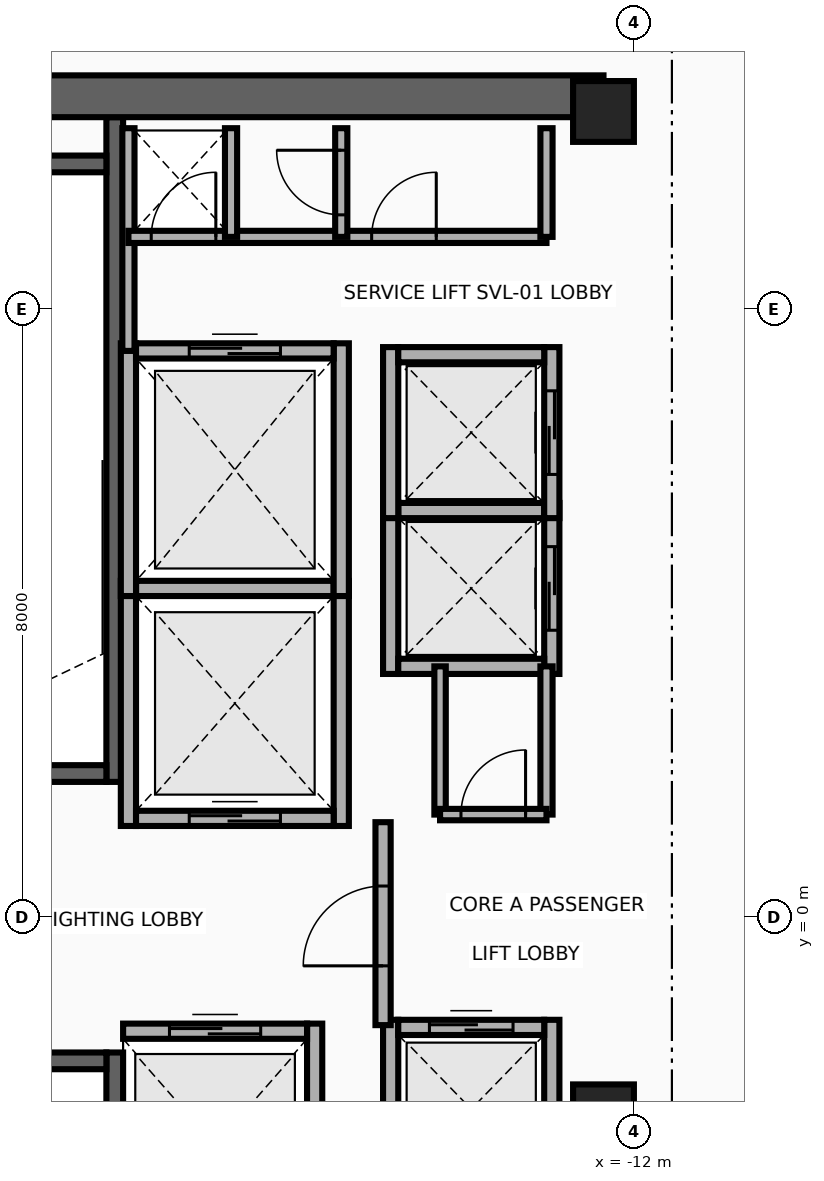
"""IFC4 building model, lengths in metres.
Left out: names, types, materials, properties, quantities, classifications, styles, units other than length and angle.
Written with IfcOpenShell. Run it as: python <this file> out.ifc"""

import sys

from ifc_helpers import new_model, si_unit, direction, frame, frame_2d, origin, origin_2d, place, context, subcontext, project, spatial, rectangle, extrude, source, transform, mapped, element, fill, save


model = new_model("IFC4")
c1 = context("Model", 3, precision=1e-05, world=origin(), true_north=direction((0.0, 1.0)))
c2 = subcontext(c1, "Body", "Model", "MODEL_VIEW")
j1 = project(units=[si_unit("LENGTHUNIT", "METRE"), si_unit("PLANEANGLEUNIT", "RADIAN")], contexts=[c1])
p1 = place(None, origin())
s1 = spatial("IfcSite", under=j1, at=p1, CompositionType="ELEMENT")
p2 = place(p1, origin())
s2 = spatial("IfcBuilding", under=s1, at=p2, CompositionType="ELEMENT")
p3 = place(p2, frame((0.0, 0.0, 240.5)))
s3 = spatial("IfcBuildingStorey", under=s2, at=p3, CompositionType="ELEMENT", Elevation=240.5)
p4 = place(p3, frame((-18.83, 1.78, 0.0), z_axis=(0.0, 0.0, 1.0), x_axis=(0.0, 1.0, 0.0)))
e1 = element("IfcWall", 1, at=p4, inside=s3, PredefinedType="SHEAR", context=c2, shape_type="SweptSolid", body=[
    extrude(rectangle(XDim=8.745, YDim=0.22, at=frame_2d((4.373, 0.0))), origin(), (0.0, 0.0, 1.0), 3.26),
])
p5 = place(p3, frame((-22.05, 1.89, 0.0), z_axis=(0.0, 0.0, 1.0), x_axis=(1.0, 0.0, 0.0)))
e2 = element("IfcWall", 2, at=p5, inside=s3, PredefinedType="SHEAR", context=c2, shape_type="SweptSolid", body=[
    extrude(rectangle(XDim=3.11, YDim=0.22, at=frame_2d((1.555, 0.0))), origin(), (0.0, 0.0, 1.0), 3.26),
])
p6 = place(p5, frame((1.0, 0.0, 0.0)))
e3 = element("IfcOpeningElement", 3, at=p6, cuts=e2, PredefinedType="OPENING", context=c2, shape_type="SweptSolid", body=[
    extrude(rectangle(XDim=1.1, YDim=2.15, at=frame_2d((0.55, 1.075))), frame((0.0, 0.125, 0.0), z_axis=(0.0, -1.0, 0.0), x_axis=(1.0, 0.0, 0.0)), (0.0, 0.0, 1.0), 0.25),
])
p7 = place(p3, frame((-22.05, 9.91, 0.0), z_axis=(0.0, 0.0, 1.0), x_axis=(1.0, 0.0, 0.0)))
e4 = element("IfcWall", 4, at=p7, inside=s3, PredefinedType="SHEAR", context=c2, shape_type="SweptSolid", body=[
    extrude(rectangle(XDim=3.11, YDim=0.22, at=frame_2d((1.555, 0.0))), origin(), (0.0, 0.0, 1.0), 3.26),
])
p8 = place(p3, frame((-18.83, -10.525, 0.0), z_axis=(0.0, 0.0, 1.0), x_axis=(0.0, 1.0, 0.0)))
e5 = element("IfcWall", 5, at=p8, inside=s3, PredefinedType="SHEAR", context=c2, shape_type="SweptSolid", body=[
    extrude(rectangle(XDim=8.745, YDim=0.22, at=frame_2d((4.373, 0.0))), origin(), (0.0, 0.0, 1.0), 3.26),
])
p9 = place(p3, frame((-22.05, -1.89, 0.0), z_axis=(0.0, 0.0, 1.0), x_axis=(1.0, 0.0, 0.0)))
e6 = element("IfcWall", 6, at=p9, inside=s3, PredefinedType="SHEAR", context=c2, shape_type="SweptSolid", body=[
    extrude(rectangle(XDim=3.11, YDim=0.22, at=frame_2d((1.555, 0.0))), origin(), (0.0, 0.0, 1.0), 3.26),
])
p10 = place(p9, frame((1.0, 0.0, 0.0)))
e7 = element("IfcOpeningElement", 7, at=p10, cuts=e6, PredefinedType="OPENING", context=c2, shape_type="SweptSolid", body=[
    extrude(rectangle(XDim=1.1, YDim=2.15, at=frame_2d((0.55, 1.075))), frame((0.0, 0.125, 0.0), z_axis=(0.0, -1.0, 0.0), x_axis=(1.0, 0.0, 0.0)), (0.0, 0.0, 1.0), 0.25),
])
p11 = place(p3, frame((-22.65, 10.8, 0.0), z_axis=(0.0, 0.0, 1.0), x_axis=(1.0, 0.0, 0.0)))
e8 = element("IfcWall", 8, at=p11, inside=s3, PredefinedType="SHEAR", context=c2, shape_type="SweptSolid", body=[
    extrude(rectangle(XDim=10.25, YDim=0.55, at=frame_2d((5.125, 0.0))), origin(), (0.0, 0.0, 1.0), 3.26),
])
m1 = source(origin(), c2, "Body", "SweptSolid", [
    extrude(rectangle(XDim=0.8, YDim=0.8, at=origin_2d()), origin(), (0.0, 0.0, 1.0), 3.5),
])
for number, where, z_axis, x_axis in (
    (9, (-12.4, -2.6, 0.0), (0.0, 0.0, 1.0), (1.0, 0.0, 0.0)),
    (10, (-12.4, 10.6, 0.0), (0.0, 0.0, 1.0), (1.0, 0.0, 0.0)),
):
    element("IfcColumn", number, at=place(p3, frame(where, z_axis=z_axis, x_axis=x_axis)), inside=s3, PredefinedType="COLUMN", context=c2, shape_type="MappedRepresentation", body=[
        mapped(m1, transform((0.0, 0.0, 0.0), x_axis=(1.0, 0.0, 0.0), y_axis=(0.0, 1.0, 0.0), z_axis=(0.0, 0.0, 1.0), scale=1.0)),
    ])
for number, where, z_axis, x_axis in (
    (11, (-18.65, 1.2, 0.0), (0.0, 0.0, 1.0), (0.0, 1.0, 0.0)),
    (12, (-15.85, 1.2, 0.0), (0.0, 0.0, 1.0), (0.0, 1.0, 0.0)),
):
    element("IfcWall", number, at=place(p3, frame(where, z_axis=z_axis, x_axis=x_axis)), inside=s3, PredefinedType="MOVABLE", context=c2, shape_type="SweptSolid", body=[
        extrude(rectangle(XDim=3.225, YDim=0.2, at=frame_2d((1.613, 0.0))), origin(), (0.0, 0.0, 1.0), 3.26),
    ])
p12 = place(p3, frame((-18.55, 1.3, 0.0), z_axis=(0.0, 0.0, 1.0), x_axis=(1.0, 0.0, 0.0)))
e13 = element("IfcWall", 13, at=p12, inside=s3, PredefinedType="MOVABLE", context=c2, shape_type="SweptSolid", body=[
    extrude(rectangle(XDim=2.6, YDim=0.2, at=frame_2d((1.3, 0.0))), origin(), (0.0, 0.0, 1.0), 3.26),
])
p13 = place(p12, frame((0.7, 0.0, 0.0)))
e14 = element("IfcOpeningElement", 14, at=p13, cuts=e13, PredefinedType="OPENING", context=c2, shape_type="SweptSolid", body=[
    extrude(rectangle(XDim=1.2, YDim=2.1, at=frame_2d((0.6, 1.05))), frame((0.0, 0.115, 0.0), z_axis=(0.0, -1.0, 0.0), x_axis=(1.0, 0.0, 0.0)), (0.0, 0.0, 1.0), 0.23),
])
p14 = place(p3, frame((-18.55, 4.325, 0.0), z_axis=(0.0, 0.0, 1.0), x_axis=(1.0, 0.0, 0.0)))
e15 = element("IfcWall", 15, at=p14, inside=s3, PredefinedType="MOVABLE", context=c2, shape_type="SweptSolid", body=[
    extrude(rectangle(XDim=2.6, YDim=0.2, at=frame_2d((1.3, 0.0))), origin(), (0.0, 0.0, 1.0), 3.26),
])
p15 = place(p3, frame((-16.2, -4.6, 0.0), z_axis=(0.0, 0.0, 1.0), x_axis=(0.0, 1.0, 0.0)))
e16 = element("IfcWall", 16, at=p15, inside=s3, PredefinedType="MOVABLE", context=c2, shape_type="SweptSolid", body=[
    extrude(rectangle(XDim=3.2, YDim=0.2, at=frame_2d((1.6, 0.0))), origin(), (0.0, 0.0, 1.0), 3.26),
])
p16 = place(p3, frame((-18.72, -1.5, 0.0), z_axis=(0.0, 0.0, 1.0), x_axis=(1.0, 0.0, 0.0)))
e17 = element("IfcWall", 17, at=p16, inside=s3, PredefinedType="MOVABLE", context=c2, shape_type="SweptSolid", body=[
    extrude(rectangle(XDim=2.42, YDim=0.2, at=frame_2d((1.21, 0.0))), origin(), (0.0, 0.0, 1.0), 3.26),
])
p17 = place(p16, frame((0.61, 0.0, 0.0)))
e18 = element("IfcOpeningElement", 18, at=p17, cuts=e17, PredefinedType="OPENING", context=c2, shape_type="SweptSolid", body=[
    extrude(rectangle(XDim=1.2, YDim=2.1, at=frame_2d((0.6, 1.05))), frame((0.0, 0.115, 0.0), z_axis=(0.0, -1.0, 0.0), x_axis=(1.0, 0.0, 0.0)), (0.0, 0.0, 1.0), 0.23),
])
for number, where, z_axis, x_axis in (
    (19, (-18.65, 4.225, 0.0), (0.0, 0.0, 1.0), (0.0, 1.0, 0.0)),
    (20, (-15.85, 4.225, 0.0), (0.0, 0.0, 1.0), (0.0, 1.0, 0.0)),
):
    element("IfcWall", number, at=place(p3, frame(where, z_axis=z_axis, x_axis=x_axis)), inside=s3, PredefinedType="MOVABLE", context=c2, shape_type="SweptSolid", body=[
        extrude(rectangle(XDim=3.325, YDim=0.2, at=frame_2d((1.663, 0.0))), origin(), (0.0, 0.0, 1.0), 3.26),
    ])
p18 = place(p3, frame((-18.55, 7.45, 0.0), z_axis=(0.0, 0.0, 1.0), x_axis=(1.0, 0.0, 0.0)))
e21 = element("IfcWall", 21, at=p18, inside=s3, PredefinedType="MOVABLE", context=c2, shape_type="SweptSolid", body=[
    extrude(rectangle(XDim=2.6, YDim=0.2, at=frame_2d((1.3, 0.0))), origin(), (0.0, 0.0, 1.0), 3.26),
])
p19 = place(p18, frame((0.7, 0.0, 0.0)))
e22 = element("IfcOpeningElement", 22, at=p19, cuts=e21, PredefinedType="OPENING", context=c2, shape_type="SweptSolid", body=[
    extrude(rectangle(XDim=1.2, YDim=2.1, at=frame_2d((0.6, 1.05))), frame((0.0, 0.115, 0.0), z_axis=(0.0, -1.0, 0.0), x_axis=(1.0, 0.0, 0.0)), (0.0, 0.0, 1.0), 0.23),
])
p20 = place(p3, frame((-15.2, 3.2, 0.0), z_axis=(0.0, 0.0, 1.0), x_axis=(0.0, 1.0, 0.0)))
e23 = element("IfcWall", 23, at=p20, inside=s3, PredefinedType="MOVABLE", context=c2, shape_type="SweptSolid", body=[
    extrude(rectangle(XDim=2.25, YDim=0.2, at=frame_2d((1.125, 0.0))), origin(), (0.0, 0.0, 1.0), 3.26),
])
p21 = place(p3, frame((-13.08, 3.2, 0.0), z_axis=(0.0, 0.0, 1.0), x_axis=(0.0, 1.0, 0.0)))
e24 = element("IfcWall", 24, at=p21, inside=s3, PredefinedType="MOVABLE", context=c2, shape_type="SweptSolid", body=[
    extrude(rectangle(XDim=2.25, YDim=0.2, at=frame_2d((1.125, 0.0))), origin(), (0.0, 0.0, 1.0), 3.26),
])
p22 = place(p21, frame((0.575, 0.0, 0.0)))
e25 = element("IfcOpeningElement", 25, at=p22, cuts=e24, PredefinedType="OPENING", context=c2, shape_type="SweptSolid", body=[
    extrude(rectangle(XDim=1.1, YDim=2.1, at=frame_2d((0.55, 1.05))), frame((0.0, 0.115, 0.0), z_axis=(0.0, -1.0, 0.0), x_axis=(1.0, 0.0, 0.0)), (0.0, 0.0, 1.0), 0.23),
])
for number, where, z_axis, x_axis in (
    (26, (-15.1, 3.3, 0.0), (0.0, 0.0, 1.0), (1.0, 0.0, 0.0)),
    (27, (-15.1, 5.35, 0.0), (0.0, 0.0, 1.0), (1.0, 0.0, 0.0)),
):
    element("IfcWall", number, at=place(p3, frame(where, z_axis=z_axis, x_axis=x_axis)), inside=s3, PredefinedType="MOVABLE", context=c2, shape_type="SweptSolid", body=[
        extrude(rectangle(XDim=1.92, YDim=0.2, at=frame_2d((0.96, 0.0))), origin(), (0.0, 0.0, 1.0), 3.26),
    ])
p23 = place(p3, frame((-15.2, 5.25, 0.0), z_axis=(0.0, 0.0, 1.0), x_axis=(0.0, 1.0, 0.0)))
e28 = element("IfcWall", 28, at=p23, inside=s3, PredefinedType="MOVABLE", context=c2, shape_type="SweptSolid", body=[
    extrude(rectangle(XDim=2.25, YDim=0.2, at=frame_2d((1.125, 0.0))), origin(), (0.0, 0.0, 1.0), 3.26),
])
p24 = place(p3, frame((-13.08, 5.25, 0.0), z_axis=(0.0, 0.0, 1.0), x_axis=(0.0, 1.0, 0.0)))
e29 = element("IfcWall", 29, at=p24, inside=s3, PredefinedType="MOVABLE", context=c2, shape_type="SweptSolid", body=[
    extrude(rectangle(XDim=2.25, YDim=0.2, at=frame_2d((1.125, 0.0))), origin(), (0.0, 0.0, 1.0), 3.26),
])
p25 = place(p24, frame((0.575, 0.0, 0.0)))
e30 = element("IfcOpeningElement", 30, at=p25, cuts=e29, PredefinedType="OPENING", context=c2, shape_type="SweptSolid", body=[
    extrude(rectangle(XDim=1.1, YDim=2.1, at=frame_2d((0.55, 1.05))), frame((0.0, 0.115, 0.0), z_axis=(0.0, -1.0, 0.0), x_axis=(1.0, 0.0, 0.0)), (0.0, 0.0, 1.0), 0.23),
])
p26 = place(p3, frame((-15.1, 7.4, 0.0), z_axis=(0.0, 0.0, 1.0), x_axis=(1.0, 0.0, 0.0)))
e31 = element("IfcWall", 31, at=p26, inside=s3, PredefinedType="MOVABLE", context=c2, shape_type="SweptSolid", body=[
    extrude(rectangle(XDim=1.92, YDim=0.2, at=frame_2d((0.96, 0.0))), origin(), (0.0, 0.0, 1.0), 3.26),
])
for number, where, z_axis, x_axis in (
    (32, (-15.2, -3.7, 0.0), (0.0, 0.0, 1.0), (0.0, 1.0, 0.0)),
    (33, (-13.08, -3.7, 0.0), (0.0, 0.0, 1.0), (0.0, 1.0, 0.0)),
):
    element("IfcWall", number, at=place(p3, frame(where, z_axis=z_axis, x_axis=x_axis)), inside=s3, PredefinedType="MOVABLE", context=c2, shape_type="SweptSolid", body=[
        extrude(rectangle(XDim=2.35, YDim=0.2, at=frame_2d((1.175, 0.0))), origin(), (0.0, 0.0, 1.0), 3.26),
    ])
p27 = place(p3, frame((-15.1, -1.45, 0.0), z_axis=(0.0, 0.0, 1.0), x_axis=(1.0, 0.0, 0.0)))
e34 = element("IfcWall", 34, at=p27, inside=s3, PredefinedType="MOVABLE", context=c2, shape_type="SweptSolid", body=[
    extrude(rectangle(XDim=1.92, YDim=0.2, at=frame_2d((0.96, 0.0))), origin(), (0.0, 0.0, 1.0), 3.26),
])
p28 = place(p27, frame((0.41, 0.0, 0.0)))
e35 = element("IfcOpeningElement", 35, at=p28, cuts=e34, PredefinedType="OPENING", context=c2, shape_type="SweptSolid", body=[
    extrude(rectangle(XDim=1.1, YDim=2.1, at=frame_2d((0.55, 1.05))), frame((0.0, 0.115, 0.0), z_axis=(0.0, -1.0, 0.0), x_axis=(1.0, 0.0, 0.0)), (0.0, 0.0, 1.0), 0.23),
])
p29 = place(p3, frame((-15.3, -1.42, 0.0), z_axis=(0.0, 0.0, 1.0), x_axis=(0.0, 1.0, 0.0)))
e36 = element("IfcWall", 36, at=p29, inside=s3, PredefinedType="PARTITIONING", context=c2, shape_type="SweptSolid", body=[
    extrude(rectangle(XDim=2.67, YDim=0.2, at=frame_2d((1.335, 0.0))), origin(), (0.0, 0.0, 1.0), 3.26),
])
p30 = place(p29, frame((0.78, 0.0, 0.0)))
e37 = element("IfcOpeningElement", 37, at=p30, cuts=e36, PredefinedType="OPENING", context=c2, shape_type="SweptSolid", body=[
    extrude(rectangle(XDim=1.05, YDim=2.15, at=frame_2d((0.525, 1.075))), frame((0.0, 0.115, 0.0), z_axis=(0.0, -1.0, 0.0), x_axis=(1.0, 0.0, 0.0)), (0.0, 0.0, 1.0), 0.23),
])
p31 = place(p3, frame((-18.65, 7.45, 0.0), z_axis=(0.0, 0.0, 1.0), x_axis=(0.0, 1.0, 0.0)))
e38 = element("IfcWall", 38, at=p31, inside=s3, PredefinedType="PARTITIONING", context=c2, shape_type="SweptSolid", body=[
    extrude(rectangle(XDim=2.93, YDim=0.16, at=frame_2d((1.465, 0.0))), origin(), (0.0, 0.0, 1.0), 3.26),
])
p32 = place(p3, frame((-18.65, 8.95, 0.0), z_axis=(0.0, 0.0, 1.0), x_axis=(1.0, 0.0, 0.0)))
e39 = element("IfcWall", 39, at=p32, inside=s3, PredefinedType="PARTITIONING", context=c2, shape_type="SweptSolid", body=[
    extrude(rectangle(XDim=5.5, YDim=0.16, at=frame_2d((2.75, 0.0))), origin(), (0.0, 0.0, 1.0), 3.26),
])
p33 = place(p32, frame((0.3, 0.0, 0.0)))
e40 = element("IfcOpeningElement", 40, at=p33, cuts=e39, PredefinedType="OPENING", context=c2, shape_type="SweptSolid", body=[
    extrude(rectangle(XDim=0.85, YDim=2.05, at=frame_2d((0.425, 1.025))), frame((0.0, 0.095, 0.0), z_axis=(0.0, -1.0, 0.0), x_axis=(1.0, 0.0, 0.0)), (0.0, 0.0, 1.0), 0.19),
])
p34 = place(p32, frame((3.2, 0.0, 0.0)))
e41 = element("IfcOpeningElement", 41, at=p34, cuts=e39, PredefinedType="OPENING", context=c2, shape_type="SweptSolid", body=[
    extrude(rectangle(XDim=0.85, YDim=2.05, at=frame_2d((0.425, 1.025))), frame((0.0, 0.095, 0.0), z_axis=(0.0, -1.0, 0.0), x_axis=(1.0, 0.0, 0.0)), (0.0, 0.0, 1.0), 0.19),
])
for number, where, z_axis, x_axis in (
    (42, (-13.15, 8.95, 0.0), (0.0, 0.0, 1.0), (0.0, 1.0, 0.0)),
    (43, (-17.3, 8.95, 0.0), (0.0, 0.0, 1.0), (0.0, 1.0, 0.0)),
):
    element("IfcWall", number, at=place(p3, frame(where, z_axis=z_axis, x_axis=x_axis)), inside=s3, PredefinedType="PARTITIONING", context=c2, shape_type="SweptSolid", body=[
        extrude(rectangle(XDim=1.43, YDim=0.16, at=frame_2d((0.715, 0.0))), origin(), (0.0, 0.0, 1.0), 3.26),
    ])
p35 = place(p3, frame((-15.85, 8.95, 0.0), z_axis=(0.0, 0.0, 1.0), x_axis=(0.0, 1.0, 0.0)))
e44 = element("IfcWall", 44, at=p35, inside=s3, PredefinedType="PARTITIONING", context=c2, shape_type="SweptSolid", body=[
    extrude(rectangle(XDim=1.43, YDim=0.16, at=frame_2d((0.715, 0.0))), origin(), (0.0, 0.0, 1.0), 3.26),
])
p36 = place(p35, frame((0.29, 0.0, 0.0)))
e45 = element("IfcOpeningElement", 45, at=p36, cuts=e44, PredefinedType="OPENING", context=c2, shape_type="SweptSolid", body=[
    extrude(rectangle(XDim=0.85, YDim=2.05, at=frame_2d((0.425, 1.025))), frame((0.0, 0.095, 0.0), z_axis=(0.0, -1.0, 0.0), x_axis=(1.0, 0.0, 0.0)), (0.0, 0.0, 1.0), 0.19),
])
p37 = place(p3, frame((-13.15, 1.35, 0.0), z_axis=(0.0, 0.0, 1.0), x_axis=(0.0, 1.0, 0.0)))
e46 = element("IfcWall", 46, at=p37, inside=s3, PredefinedType="PARTITIONING", context=c2, shape_type="SweptSolid", body=[
    extrude(rectangle(XDim=1.95, YDim=0.16, at=frame_2d((0.975, 0.0))), origin(), (0.0, 0.0, 1.0), 3.26),
])
p38 = place(p3, frame((-14.55, 1.35, 0.0), z_axis=(0.0, 0.0, 1.0), x_axis=(0.0, 1.0, 0.0)))
e47 = element("IfcWall", 47, at=p38, inside=s3, PredefinedType="PARTITIONING", context=c2, shape_type="SweptSolid", body=[
    extrude(rectangle(XDim=1.95, YDim=0.15, at=frame_2d((0.975, 0.0))), origin(), (0.0, 0.0, 1.0), 3.26),
])
p39 = place(p3, frame((-14.55, 1.35, 0.0), z_axis=(0.0, 0.0, 1.0), x_axis=(1.0, 0.0, 0.0)))
e48 = element("IfcWall", 48, at=p39, inside=s3, PredefinedType="PARTITIONING", context=c2, shape_type="SweptSolid", body=[
    extrude(rectangle(XDim=1.4, YDim=0.15, at=frame_2d((0.7, 0.0))), origin(), (0.0, 0.0, 1.0), 3.26),
])
p40 = place(p39, frame((0.275, 0.0, 0.0)))
e49 = element("IfcOpeningElement", 49, at=p40, cuts=e48, PredefinedType="OPENING", context=c2, shape_type="SweptSolid", body=[
    extrude(rectangle(XDim=0.85, YDim=2.05, at=frame_2d((0.425, 1.025))), frame((0.0, 0.09, 0.0), z_axis=(0.0, -1.0, 0.0), x_axis=(1.0, 0.0, 0.0)), (0.0, 0.0, 1.0), 0.18),
])
p41 = place(p13, origin())
e50 = element("IfcDoor", 50, at=p41, inside=s3, OperationType="DOUBLE_DOOR_SLIDING", PredefinedType="DOOR", context=c2, shape_type="SweptSolid", body=[
    extrude(rectangle(XDim=1.2, YDim=2.1, at=frame_2d((0.6, 1.05))), frame((0.0, 0.025, 0.0), z_axis=(0.0, -1.0, 0.0), x_axis=(1.0, 0.0, 0.0)), (0.0, 0.0, 1.0), 0.05),
])
fill(e14, e50)
p42 = place(p17, origin())
e51 = element("IfcDoor", 51, at=p42, inside=s3, OperationType="DOUBLE_DOOR_SLIDING", PredefinedType="DOOR", context=c2, shape_type="SweptSolid", body=[
    extrude(rectangle(XDim=1.2, YDim=2.1, at=frame_2d((0.6, 1.05))), frame((0.0, 0.025, 0.0), z_axis=(0.0, -1.0, 0.0), x_axis=(1.0, 0.0, 0.0)), (0.0, 0.0, 1.0), 0.05),
])
fill(e18, e51)
p43 = place(p19, origin())
e52 = element("IfcDoor", 52, at=p43, inside=s3, OperationType="DOUBLE_DOOR_SLIDING", PredefinedType="DOOR", context=c2, shape_type="SweptSolid", body=[
    extrude(rectangle(XDim=1.2, YDim=2.1, at=frame_2d((0.6, 1.05))), frame((0.0, 0.025, 0.0), z_axis=(0.0, -1.0, 0.0), x_axis=(1.0, 0.0, 0.0)), (0.0, 0.0, 1.0), 0.05),
])
fill(e22, e52)
p44 = place(p22, origin())
e53 = element("IfcDoor", 53, at=p44, inside=s3, OperationType="DOUBLE_DOOR_SLIDING", PredefinedType="DOOR", context=c2, shape_type="SweptSolid", body=[
    extrude(rectangle(XDim=1.1, YDim=2.1, at=frame_2d((0.55, 1.05))), frame((0.0, 0.025, 0.0), z_axis=(0.0, -1.0, 0.0), x_axis=(1.0, 0.0, 0.0)), (0.0, 0.0, 1.0), 0.05),
])
fill(e25, e53)
p45 = place(p25, origin())
e54 = element("IfcDoor", 54, at=p45, inside=s3, OperationType="DOUBLE_DOOR_SLIDING", PredefinedType="DOOR", context=c2, shape_type="SweptSolid", body=[
    extrude(rectangle(XDim=1.1, YDim=2.1, at=frame_2d((0.55, 1.05))), frame((0.0, 0.025, 0.0), z_axis=(0.0, -1.0, 0.0), x_axis=(1.0, 0.0, 0.0)), (0.0, 0.0, 1.0), 0.05),
])
fill(e30, e54)
p46 = place(p28, origin())
e55 = element("IfcDoor", 55, at=p46, inside=s3, OperationType="DOUBLE_DOOR_SLIDING", PredefinedType="DOOR", context=c2, shape_type="SweptSolid", body=[
    extrude(rectangle(XDim=1.1, YDim=2.1, at=frame_2d((0.55, 1.05))), frame((0.0, 0.025, 0.0), z_axis=(0.0, -1.0, 0.0), x_axis=(1.0, 0.0, 0.0)), (0.0, 0.0, 1.0), 0.05),
])
fill(e35, e55)
p47 = place(p30, origin())
e56 = element("IfcDoor", 56, at=p47, inside=s3, OperationType="SINGLE_SWING_RIGHT", PredefinedType="DOOR", context=c2, shape_type="SweptSolid", body=[
    extrude(rectangle(XDim=1.05, YDim=2.15, at=frame_2d((0.525, 1.075))), frame((0.0, 0.025, 0.0), z_axis=(0.0, -1.0, 0.0), x_axis=(1.0, 0.0, 0.0)), (0.0, 0.0, 1.0), 0.05),
])
fill(e37, e56)
p48 = place(p33, origin())
e57 = element("IfcDoor", 57, at=p48, inside=s3, OperationType="SINGLE_SWING_LEFT", PredefinedType="DOOR", context=c2, shape_type="SweptSolid", body=[
    extrude(rectangle(XDim=0.85, YDim=2.05, at=frame_2d((0.425, 1.025))), frame((0.0, 0.025, 0.0), z_axis=(0.0, -1.0, 0.0), x_axis=(1.0, 0.0, 0.0)), (0.0, 0.0, 1.0), 0.05),
])
fill(e40, e57)
p49 = place(p34, origin())
e58 = element("IfcDoor", 58, at=p49, inside=s3, OperationType="SINGLE_SWING_RIGHT", PredefinedType="DOOR", context=c2, shape_type="SweptSolid", body=[
    extrude(rectangle(XDim=0.85, YDim=2.05, at=frame_2d((0.425, 1.025))), frame((0.0, 0.025, 0.0), z_axis=(0.0, -1.0, 0.0), x_axis=(1.0, 0.0, 0.0)), (0.0, 0.0, 1.0), 0.05),
])
fill(e41, e58)
p50 = place(p36, origin())
e59 = element("IfcDoor", 59, at=p50, inside=s3, OperationType="SINGLE_SWING_LEFT", PredefinedType="DOOR", context=c2, shape_type="SweptSolid", body=[
    extrude(rectangle(XDim=0.85, YDim=2.05, at=frame_2d((0.425, 1.025))), frame((0.0, 0.025, 0.0), z_axis=(0.0, -1.0, 0.0), x_axis=(1.0, 0.0, 0.0)), (0.0, 0.0, 1.0), 0.05),
])
fill(e45, e59)
p51 = place(p40, origin())
e60 = element("IfcDoor", 60, at=p51, inside=s3, OperationType="SINGLE_SWING_RIGHT", PredefinedType="DOOR", context=c2, shape_type="SweptSolid", body=[
    extrude(rectangle(XDim=0.85, YDim=2.05, at=frame_2d((0.425, 1.025))), frame((0.0, 0.025, 0.0), z_axis=(0.0, -1.0, 0.0), x_axis=(1.0, 0.0, 0.0)), (0.0, 0.0, 1.0), 0.05),
])
fill(e49, e60)
save(model, sys.argv[1])
